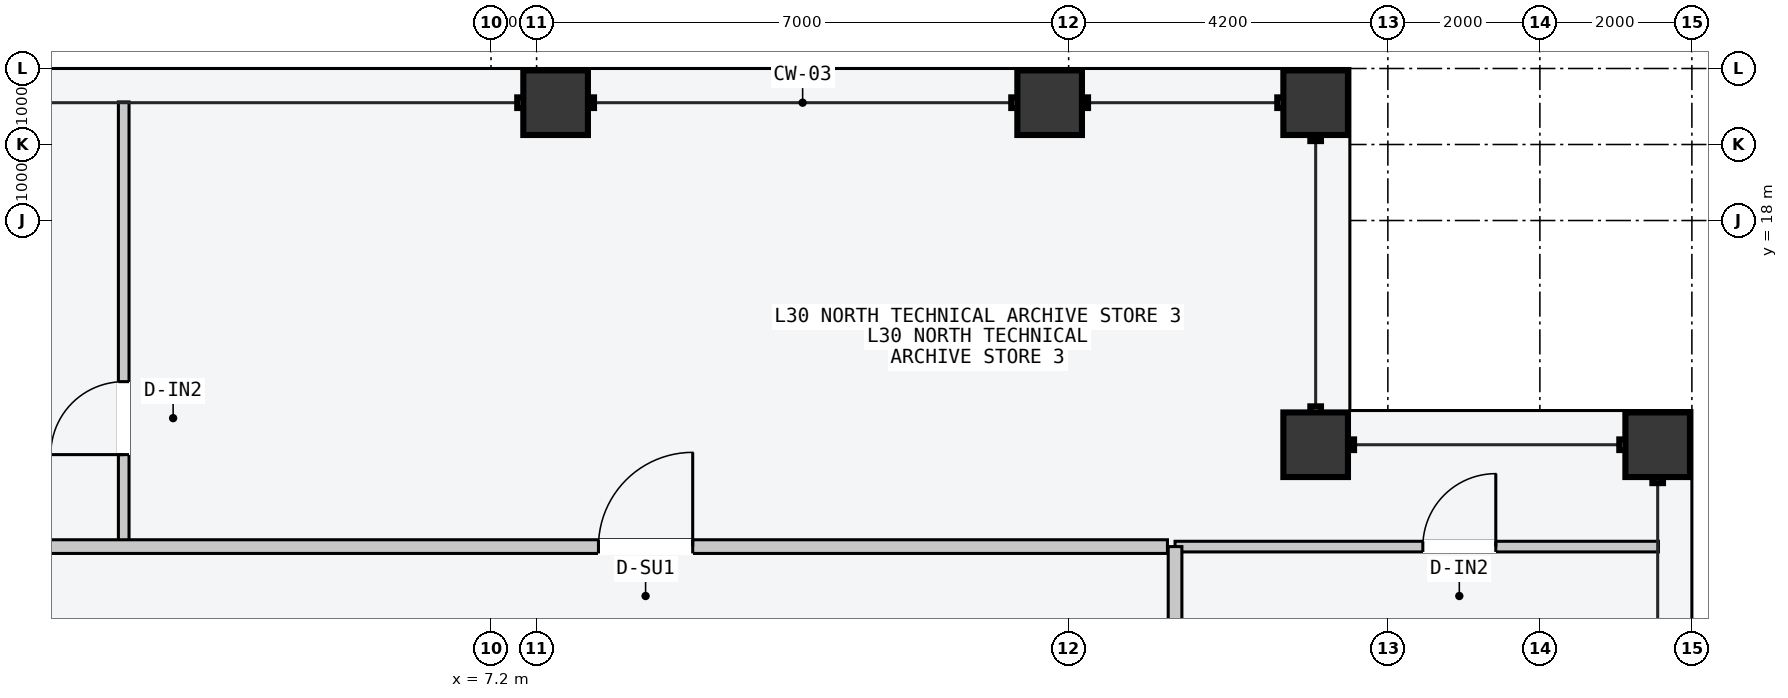
"""IFC4 building model, lengths in metres.
Left out: names, types, materials, properties, quantities, classifications, styles, units other than length and angle.
Written with IfcOpenShell. Run it as: python <this file> out.ifc"""

import sys

from ifc_helpers import new_model, si_unit, direction, frame, frame_2d, origin, origin_2d, place, context, subcontext, project, spatial, rectangle, hollow_rectangle, extrude, element, fill, save


model = new_model("IFC4")
c1 = context("Model", 3, precision=1e-05, world=origin(), true_north=direction((0.0, 1.0)))
c2 = subcontext(c1, "Body", "Model", "MODEL_VIEW")
j1 = project(units=[si_unit("LENGTHUNIT", "METRE"), si_unit("PLANEANGLEUNIT", "RADIAN")], contexts=[c1])
p1 = place(None, origin())
s1 = spatial("IfcSite", under=j1, at=p1, CompositionType="ELEMENT")
p2 = place(p1, origin())
s2 = spatial("IfcBuilding", under=s1, at=p2, CompositionType="ELEMENT")
p3 = place(p2, frame((0.0, 0.0, 117.0)))
s3 = spatial("IfcBuildingStorey", under=s2, at=p3, CompositionType="ELEMENT", Elevation=117.0)
for number, where, z_axis, x_axis in (
    (1, (8.05, 19.55, 0.0), (0.0, 0.0, 1.0), (1.0, 0.0, 0.0)),
    (2, (14.55, 19.55, 0.0), (0.0, 0.0, 1.0), (1.0, 0.0, 0.0)),
    (3, (18.05, 19.55, 0.0), (0.0, 0.0, 1.0), (1.0, 0.0, 0.0)),
    (4, (22.55, 15.05, 0.0), (0.0, 0.0, 1.0), (0.0, 1.0, 0.0)),
    (5, (18.05, 15.05, 0.0), (0.0, 0.0, 1.0), (1.0, 0.0, 0.0)),
):
    element("IfcColumn", number, at=place(p3, frame(where, z_axis=z_axis, x_axis=x_axis)), inside=s3, PredefinedType="COLUMN", context=c2, shape_type="SweptSolid", body=[
        extrude(hollow_rectangle(XDim=0.85, YDim=0.85, WallThickness=0.04, at=origin_2d()), origin(), (0.0, 0.0, 1.0), 3.6),
    ])
p4 = place(p3, frame((2.367, 13.77, 0.0), z_axis=(0.0, 0.0, 1.0), x_axis=(0.0, 1.0, 0.0)))
e6 = element("IfcWall", 6, at=p4, inside=s3, PredefinedType="PARTITIONING", context=c2, shape_type="SweptSolid", body=[
    extrude(rectangle(XDim=5.79, YDim=0.14, at=frame_2d((2.895, 0.0))), origin(), (0.0, 0.0, 1.0), 3.4),
])
p5 = place(p4, frame((1.15, 0.0, 0.0)))
e7 = element("IfcOpeningElement", 7, at=p5, cuts=e6, PredefinedType="OPENING", context=c2, shape_type="SweptSolid", body=[
    extrude(rectangle(XDim=0.96, YDim=2.18, at=frame_2d((0.48, 1.09))), frame((0.0, 0.08, 0.0), z_axis=(0.0, -1.0, 0.0), x_axis=(1.0, 0.0, 0.0)), (0.0, 0.0, 1.0), 0.16),
])
p6 = place(p3, frame((-16.1, 13.71, 0.0), z_axis=(0.0, 0.0, 1.0), x_axis=(1.0, 0.0, 0.0)))
e8 = element("IfcWall", 8, at=p6, inside=s3, PredefinedType="PARTITIONING", context=c2, shape_type="SweptSolid", body=[
    extrude(rectangle(XDim=32.2, YDim=0.18, at=frame_2d((16.1, 0.0))), origin(), (0.0, 0.0, 1.0), 3.4),
])
p7 = place(p6, frame((2.974, 0.0, 0.0)))
e9 = element("IfcOpeningElement", 9, at=p7, cuts=e8, PredefinedType="OPENING", context=c2, shape_type="SweptSolid", body=[
    extrude(rectangle(XDim=1.02, YDim=2.2, at=frame_2d((0.51, 1.1))), frame((0.0, 0.1, 0.0), z_axis=(0.0, -1.0, 0.0), x_axis=(1.0, 0.0, 0.0)), (0.0, 0.0, 1.0), 0.2),
])
p8 = place(p6, frame((0.3, 0.0, 0.0)))
e10 = element("IfcOpeningElement", 10, at=p8, cuts=e8, PredefinedType="OPENING", context=c2, shape_type="SweptSolid", body=[
    extrude(rectangle(XDim=1.06, YDim=2.2, at=frame_2d((0.53, 1.1))), frame((0.0, 0.1, 0.0), z_axis=(0.0, -1.0, 0.0), x_axis=(1.0, 0.0, 0.0)), (0.0, 0.0, 1.0), 0.2),
])
p9 = place(p6, frame((24.714, 0.0, 0.0)))
e11 = element("IfcOpeningElement", 11, at=p9, cuts=e8, PredefinedType="OPENING", context=c2, shape_type="SweptSolid", body=[
    extrude(rectangle(XDim=1.24, YDim=2.24, at=frame_2d((0.62, 1.12))), frame((0.0, 0.1, 0.0), z_axis=(0.0, -1.0, 0.0), x_axis=(1.0, 0.0, 0.0)), (0.0, 0.0, 1.0), 0.2),
])
p10 = place(p3, frame((16.2, 13.71, 0.0), z_axis=(0.0, 0.0, 1.0), x_axis=(1.0, 0.0, 0.0)))
e12 = element("IfcWall", 12, at=p10, inside=s3, PredefinedType="PARTITIONING", context=c2, shape_type="SweptSolid", body=[
    extrude(rectangle(XDim=6.36, YDim=0.14, at=frame_2d((3.18, 0.0))), origin(), (0.0, 0.0, 1.0), 3.4),
])
p11 = place(p10, frame((3.26, 0.0, 0.0)))
e13 = element("IfcOpeningElement", 13, at=p11, cuts=e12, PredefinedType="OPENING", context=c2, shape_type="SweptSolid", body=[
    extrude(rectangle(XDim=0.96, YDim=2.18, at=frame_2d((0.48, 1.09))), frame((0.0, 0.08, 0.0), z_axis=(0.0, -1.0, 0.0), x_axis=(1.0, 0.0, 0.0)), (0.0, 0.0, 1.0), 0.16),
])
p12 = place(p3, frame((16.2, 11.76, 0.0), z_axis=(0.0, 0.0, 1.0), x_axis=(0.0, 1.0, 0.0)))
e14 = element("IfcWall", 14, at=p12, inside=s3, PredefinedType="PARTITIONING", context=c2, shape_type="SweptSolid", body=[
    extrude(rectangle(XDim=1.95, YDim=0.18, at=frame_2d((0.975, 0.0))), origin(), (0.0, 0.0, 1.0), 3.4),
])
p13 = place(p5, origin())
e15 = element("IfcDoor", 15, at=p13, inside=s3, OperationType="SINGLE_SWING_LEFT", PredefinedType="DOOR", context=c2, shape_type="SweptSolid", body=[
    extrude(rectangle(XDim=0.96, YDim=2.18, at=frame_2d((0.48, 1.09))), frame((0.0, 0.025, 0.0), z_axis=(0.0, -1.0, 0.0), x_axis=(1.0, 0.0, 0.0)), (0.0, 0.0, 1.0), 0.05),
])
fill(e7, e15)
p14 = place(p9, origin())
e16 = element("IfcDoor", 16, at=p14, inside=s3, OperationType="SINGLE_SWING_RIGHT", PredefinedType="DOOR", context=c2, shape_type="SweptSolid", body=[
    extrude(rectangle(XDim=1.24, YDim=2.24, at=frame_2d((0.62, 1.12))), frame((0.0, 0.025, 0.0), z_axis=(0.0, -1.0, 0.0), x_axis=(1.0, 0.0, 0.0)), (0.0, 0.0, 1.0), 0.05),
])
fill(e11, e16)
p15 = place(p11, origin())
e17 = element("IfcDoor", 17, at=p15, inside=s3, OperationType="SINGLE_SWING_RIGHT", PredefinedType="DOOR", context=c2, shape_type="SweptSolid", body=[
    extrude(rectangle(XDim=0.96, YDim=2.18, at=frame_2d((0.48, 1.09))), frame((0.0, 0.025, 0.0), z_axis=(0.0, -1.0, 0.0), x_axis=(1.0, 0.0, 0.0)), (0.0, 0.0, 1.0), 0.05),
])
fill(e13, e17)
save(model, sys.argv[1])
